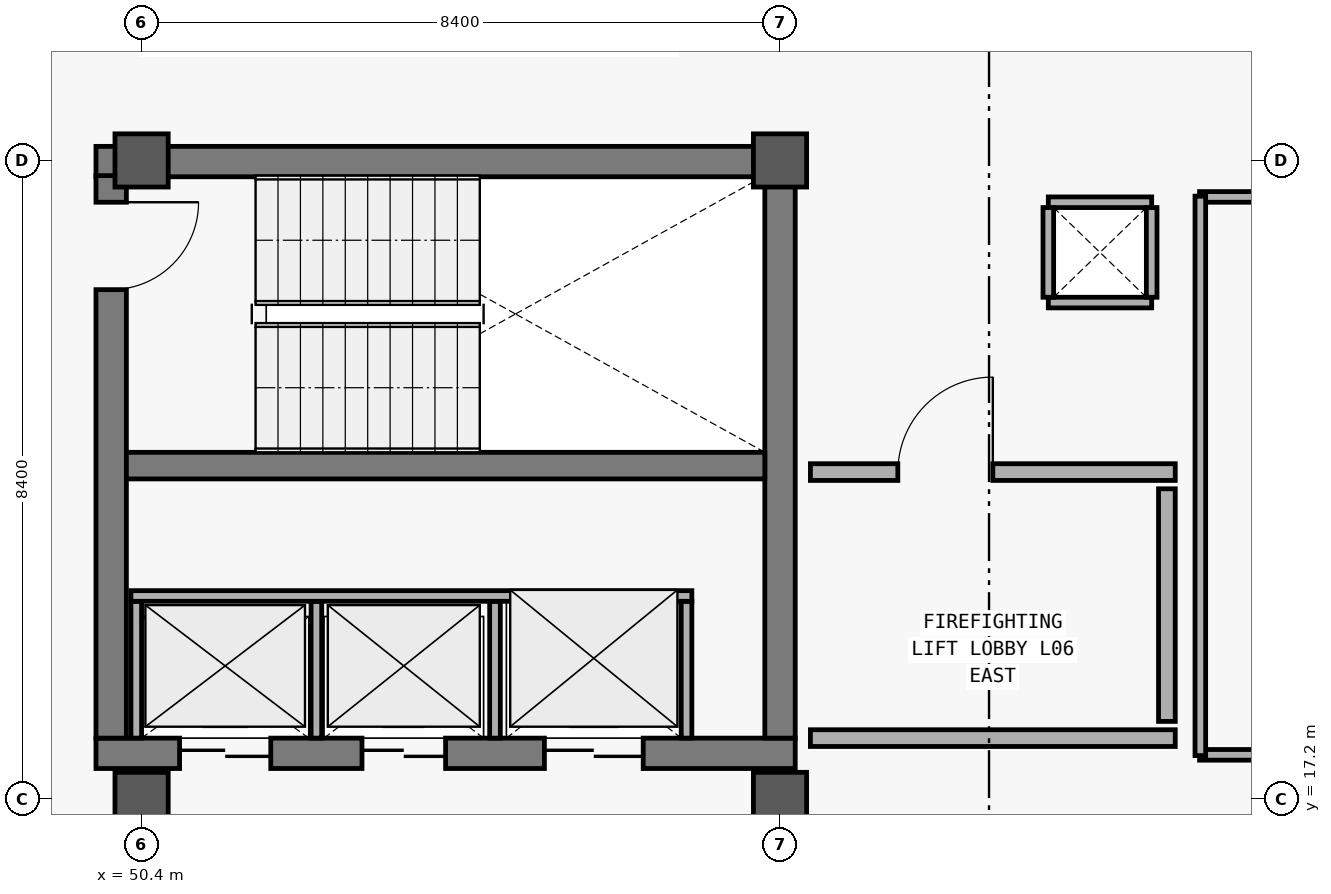
"""IFC4 building model, lengths in metres.
Left out: names, types, materials, properties, quantities, classifications, styles, units other than length and angle.
Written with IfcOpenShell. Run it as: python <this file> out.ifc"""

import sys

from ifc_helpers import new_model, si_unit, direction, frame, frame_2d, origin, origin_2d, place, context, subcontext, project, spatial, rectangle, extrude, element, fill, save


model = new_model("IFC4")
c1 = context("Model", 3, precision=1e-05, world=origin(), true_north=direction((0.0, 1.0)))
c2 = subcontext(c1, "Body", "Model", "MODEL_VIEW")
j1 = project(units=[si_unit("LENGTHUNIT", "METRE"), si_unit("PLANEANGLEUNIT", "RADIAN")], contexts=[c1])
p1 = place(None, origin())
s1 = spatial("IfcSite", under=j1, at=p1, CompositionType="ELEMENT")
p2 = place(p1, origin())
s2 = spatial("IfcBuilding", under=s1, at=p2, CompositionType="ELEMENT")
p3 = place(p2, frame((0.0, 0.0, 26.4)))
s3 = spatial("IfcBuildingStorey", under=s2, at=p3, CompositionType="ELEMENT", Elevation=26.4)
for number, where, z_axis, x_axis in (
    (1, (50.4, 17.2, 0.0), (0.0, 0.0, 1.0), (1.0, 0.0, 0.0)),
    (2, (50.4, 25.6, 0.0), (0.0, 0.0, 1.0), (1.0, 0.0, 0.0)),
    (3, (58.8, 17.2, 0.0), (0.0, 0.0, 1.0), (1.0, 0.0, 0.0)),
    (4, (58.8, 25.6, 0.0), (0.0, 0.0, 1.0), (1.0, 0.0, 0.0)),
):
    element("IfcColumn", number, at=place(p3, frame(where, z_axis=z_axis, x_axis=x_axis)), inside=s3, PredefinedType="COLUMN", context=c2, shape_type="SweptSolid", body=[
        extrude(rectangle(XDim=0.7, YDim=0.7, at=origin_2d()), origin(), (0.0, 0.0, 1.0), 3.6),
    ])
p4 = place(p3, frame((49.8, 17.8, 0.0), z_axis=(0.0, 0.0, 1.0), x_axis=(1.0, 0.0, 0.0)))
e5 = element("IfcWall", 5, at=p4, inside=s3, PredefinedType="SHEAR", context=c2, shape_type="SweptSolid", body=[
    extrude(rectangle(XDim=9.2, YDim=0.4, at=frame_2d((4.6, 0.0))), origin(), (0.0, 0.0, 1.0), 3.32),
])
p5 = place(p4, frame((1.1, 0.0, 0.0)))
e6 = element("IfcOpeningElement", 6, at=p5, cuts=e5, PredefinedType="OPENING", context=c2, shape_type="SweptSolid", body=[
    extrude(rectangle(XDim=1.2, YDim=2.2, at=frame_2d((0.6, 1.1))), frame((0.0, 0.21, 0.0), z_axis=(0.0, -1.0, 0.0), x_axis=(1.0, 0.0, 0.0)), (0.0, 0.0, 1.0), 0.42),
])
p6 = place(p4, frame((3.5, 0.0, 0.0)))
e7 = element("IfcOpeningElement", 7, at=p6, cuts=e5, PredefinedType="OPENING", context=c2, shape_type="SweptSolid", body=[
    extrude(rectangle(XDim=1.1, YDim=2.2, at=frame_2d((0.55, 1.1))), frame((0.0, 0.21, 0.0), z_axis=(0.0, -1.0, 0.0), x_axis=(1.0, 0.0, 0.0)), (0.0, 0.0, 1.0), 0.42),
])
p7 = place(p4, frame((5.9, 0.0, 0.0)))
e8 = element("IfcOpeningElement", 8, at=p7, cuts=e5, PredefinedType="OPENING", context=c2, shape_type="SweptSolid", body=[
    extrude(rectangle(XDim=1.3, YDim=2.3, at=frame_2d((0.65, 1.15))), frame((0.0, 0.21, 0.0), z_axis=(0.0, -1.0, 0.0), x_axis=(1.0, 0.0, 0.0)), (0.0, 0.0, 1.0), 0.42),
])
p8 = place(p3, frame((59.0, 25.585, 0.0), z_axis=(0.0, 0.0, 1.0), x_axis=(-1.0, 0.0, 0.0)))
e9 = element("IfcWall", 9, at=p8, inside=s3, PredefinedType="SHEAR", context=c2, shape_type="SweptSolid", body=[
    extrude(rectangle(XDim=9.2, YDim=0.4, at=frame_2d((4.6, 0.0))), origin(), (0.0, 0.0, 1.0), 3.32),
])
p9 = place(p3, frame((50.0, 25.4, 0.0), z_axis=(0.0, 0.0, 1.0), x_axis=(0.0, -1.0, 0.0)))
e10 = element("IfcWall", 10, at=p9, inside=s3, PredefinedType="SHEAR", context=c2, shape_type="SweptSolid", body=[
    extrude(rectangle(XDim=7.4, YDim=0.4, at=frame_2d((3.7, 0.0))), origin(), (0.0, 0.0, 1.0), 3.32),
])
p10 = place(p9, frame((0.35, 0.0, 0.0)))
e11 = element("IfcOpeningElement", 11, at=p10, cuts=e10, PredefinedType="OPENING", context=c2, shape_type="SweptSolid", body=[
    extrude(rectangle(XDim=1.15, YDim=2.2, at=frame_2d((0.575, 1.1))), frame((0.0, 0.21, 0.0), z_axis=(0.0, -1.0, 0.0), x_axis=(1.0, 0.0, 0.0)), (0.0, 0.0, 1.0), 0.42),
])
p11 = place(p3, frame((58.8, 18.0, 0.0), z_axis=(0.0, 0.0, 1.0), x_axis=(0.0, 1.0, 0.0)))
e12 = element("IfcWall", 12, at=p11, inside=s3, PredefinedType="SHEAR", context=c2, shape_type="SweptSolid", body=[
    extrude(rectangle(XDim=7.4, YDim=0.4, at=frame_2d((3.7, 0.0))), origin(), (0.0, 0.0, 1.0), 3.32),
])
p12 = place(p3, frame((50.2, 21.585, 0.0), z_axis=(0.0, 0.0, 1.0), x_axis=(1.0, 0.0, 0.0)))
e13 = element("IfcWall", 13, at=p12, inside=s3, PredefinedType="SHEAR", context=c2, shape_type="SweptSolid", body=[
    extrude(rectangle(XDim=8.4, YDim=0.35, at=frame_2d((4.2, 0.0))), origin(), (0.0, 0.0, 1.0), 3.32),
])
for number, where, z_axis, x_axis in (
    (14, (50.33, 18.0, 0.0), (0.0, 0.0, 1.0), (0.0, 1.0, 0.0)),
    (15, (52.7, 18.0, 0.0), (0.0, 0.0, 1.0), (0.0, 1.0, 0.0)),
    (16, (55.05, 18.0, 0.0), (0.0, 0.0, 1.0), (0.0, 1.0, 0.0)),
    (17, (57.57, 18.0, 0.0), (0.0, 0.0, 1.0), (0.0, 1.0, 0.0)),
):
    element("IfcWall", number, at=place(p3, frame(where, z_axis=z_axis, x_axis=x_axis)), inside=s3, PredefinedType="PARTITIONING", context=c2, shape_type="SweptSolid", body=[
        extrude(rectangle(XDim=1.8, YDim=0.14, at=frame_2d((0.9, 0.0))), origin(), (0.0, 0.0, 1.0), 2.47),
    ])
p13 = place(p3, frame((50.26, 19.87, 0.0), z_axis=(0.0, 0.0, 1.0), x_axis=(1.0, 0.0, 0.0)))
e18 = element("IfcWall", 18, at=p13, inside=s3, PredefinedType="PARTITIONING", context=c2, shape_type="SweptSolid", body=[
    extrude(rectangle(XDim=7.38, YDim=0.14, at=frame_2d((3.69, 0.0))), origin(), (0.0, 0.0, 1.0), 2.47),
])
p14 = place(p3, frame((59.2, 18.0, 0.0), z_axis=(0.0, 0.0, 1.0), x_axis=(1.0, 0.0, 0.0)))
e19 = element("IfcWall", 19, at=p14, inside=s3, PredefinedType="SOLIDWALL", context=c2, shape_type="SweptSolid", body=[
    extrude(rectangle(XDim=4.8, YDim=0.22, at=frame_2d((2.4, 0.0))), origin(), (0.0, 0.0, 1.0), 2.47),
])
p15 = place(p3, frame((59.2, 21.5, 0.0), z_axis=(0.0, 0.0, 1.0), x_axis=(1.0, 0.0, 0.0)))
e20 = element("IfcWall", 20, at=p15, inside=s3, PredefinedType="SOLIDWALL", context=c2, shape_type="SweptSolid", body=[
    extrude(rectangle(XDim=4.8, YDim=0.22, at=frame_2d((2.4, 0.0))), origin(), (0.0, 0.0, 1.0), 2.47),
])
p16 = place(p15, frame((1.15, 0.0, 0.0)))
e21 = element("IfcOpeningElement", 21, at=p16, cuts=e20, PredefinedType="OPENING", context=c2, shape_type="SweptSolid", body=[
    extrude(rectangle(XDim=1.25, YDim=2.2, at=frame_2d((0.625, 1.1))), frame((0.0, 0.12, 0.0), z_axis=(0.0, -1.0, 0.0), x_axis=(1.0, 0.0, 0.0)), (0.0, 0.0, 1.0), 0.24),
])
p17 = place(p3, frame((63.89, 18.22, 0.0), z_axis=(0.0, 0.0, 1.0), x_axis=(0.0, 1.0, 0.0)))
e22 = element("IfcWall", 22, at=p17, inside=s3, PredefinedType="SOLIDWALL", context=c2, shape_type="SweptSolid", body=[
    extrude(rectangle(XDim=3.06, YDim=0.22, at=frame_2d((1.53, 0.0))), origin(), (0.0, 0.0, 1.0), 2.47),
])
p18 = place(p3, frame((64.32, 17.78, 0.0), z_axis=(0.0, 0.0, 1.0), x_axis=(1.0, 0.0, 0.0)))
e23 = element("IfcWall", 23, at=p18, inside=s3, PredefinedType="PARTITIONING", context=c2, shape_type="SweptSolid", body=[
    extrude(rectangle(XDim=11.0, YDim=0.14, at=frame_2d((5.5, 0.0))), origin(), (0.0, 0.0, 1.0), 2.48),
])
p19 = place(p18, frame((5.958, 0.0, 0.0)))
e24 = element("IfcOpeningElement", 24, at=p19, cuts=e23, PredefinedType="OPENING", context=c2, shape_type="SweptSolid", body=[
    extrude(rectangle(XDim=1.08, YDim=2.25, at=frame_2d((0.54, 1.125))), frame((0.0, 0.08, 0.0), z_axis=(0.0, -1.0, 0.0), x_axis=(1.0, 0.0, 0.0)), (0.0, 0.0, 1.0), 0.16),
])
p20 = place(p3, frame((64.32, 25.12, 0.0), z_axis=(0.0, 0.0, 1.0), x_axis=(1.0, 0.0, 0.0)))
e25 = element("IfcWall", 25, at=p20, inside=s3, PredefinedType="PARTITIONING", context=c2, shape_type="SweptSolid", body=[
    extrude(rectangle(XDim=11.0, YDim=0.14, at=frame_2d((5.5, 0.0))), origin(), (0.0, 0.0, 1.0), 2.48),
])
p21 = place(p3, frame((64.33, 17.77, 0.0), z_axis=(0.0, 0.0, 1.0), x_axis=(0.0, 1.0, 0.0)))
e26 = element("IfcWall", 26, at=p21, inside=s3, PredefinedType="PARTITIONING", context=c2, shape_type="SweptSolid", body=[
    extrude(rectangle(XDim=7.36, YDim=0.14, at=frame_2d((3.68, 0.0))), origin(), (0.0, 0.0, 1.0), 2.48),
])
for number, where, z_axis, x_axis in (
    (27, (62.33, 23.73, 0.0), (0.0, 0.0, 1.0), (1.0, 0.0, 0.0)),
    (28, (63.69, 25.05, 0.0), (0.0, 0.0, 1.0), (-1.0, 0.0, 0.0)),
):
    element("IfcWall", number, at=place(p3, frame(where, z_axis=z_axis, x_axis=x_axis)), inside=s3, PredefinedType="PARTITIONING", context=c2, shape_type="SweptSolid", body=[
        extrude(rectangle(XDim=1.36, YDim=0.14, at=frame_2d((0.68, 0.0))), origin(), (0.0, 0.0, 1.0), 2.44),
    ])
for number, where, z_axis, x_axis in (
    (29, (62.33, 24.98, 0.0), (0.0, 0.0, 1.0), (0.0, -1.0, 0.0)),
    (30, (63.69, 23.8, 0.0), (0.0, 0.0, 1.0), (0.0, 1.0, 0.0)),
):
    element("IfcWall", number, at=place(p3, frame(where, z_axis=z_axis, x_axis=x_axis)), inside=s3, PredefinedType="PARTITIONING", context=c2, shape_type="SweptSolid", body=[
        extrude(rectangle(XDim=1.18, YDim=0.14, at=frame_2d((0.59, 0.0))), origin(), (0.0, 0.0, 1.0), 2.44),
    ])
p22 = place(p10, origin())
e31 = element("IfcDoor", 31, at=p22, inside=s3, OperationType="SINGLE_SWING_LEFT", PredefinedType="DOOR", context=c2, shape_type="SweptSolid", body=[
    extrude(rectangle(XDim=1.15, YDim=2.2, at=frame_2d((0.575, 1.1))), frame((0.0, 0.025, 0.0), z_axis=(0.0, -1.0, 0.0), x_axis=(1.0, 0.0, 0.0)), (0.0, 0.0, 1.0), 0.05),
])
fill(e11, e31)
p23 = place(p5, origin())
e32 = element("IfcDoor", 32, at=p23, inside=s3, OperationType="DOUBLE_DOOR_SLIDING", PredefinedType="DOOR", context=c2, shape_type="SweptSolid", body=[
    extrude(rectangle(XDim=1.2, YDim=2.2, at=frame_2d((0.6, 1.1))), frame((0.0, 0.025, 0.0), z_axis=(0.0, -1.0, 0.0), x_axis=(1.0, 0.0, 0.0)), (0.0, 0.0, 1.0), 0.05),
])
fill(e6, e32)
p24 = place(p6, origin())
e33 = element("IfcDoor", 33, at=p24, inside=s3, OperationType="DOUBLE_DOOR_SLIDING", PredefinedType="DOOR", context=c2, shape_type="SweptSolid", body=[
    extrude(rectangle(XDim=1.1, YDim=2.2, at=frame_2d((0.55, 1.1))), frame((0.0, 0.025, 0.0), z_axis=(0.0, -1.0, 0.0), x_axis=(1.0, 0.0, 0.0)), (0.0, 0.0, 1.0), 0.05),
])
fill(e7, e33)
p25 = place(p7, origin())
e34 = element("IfcDoor", 34, at=p25, inside=s3, OperationType="DOUBLE_DOOR_SLIDING", PredefinedType="DOOR", context=c2, shape_type="SweptSolid", body=[
    extrude(rectangle(XDim=1.3, YDim=2.3, at=frame_2d((0.65, 1.15))), frame((0.0, 0.025, 0.0), z_axis=(0.0, -1.0, 0.0), x_axis=(1.0, 0.0, 0.0)), (0.0, 0.0, 1.0), 0.05),
])
fill(e8, e34)
p26 = place(p16, origin())
e35 = element("IfcDoor", 35, at=p26, inside=s3, OperationType="SINGLE_SWING_RIGHT", PredefinedType="DOOR", context=c2, shape_type="SweptSolid", body=[
    extrude(rectangle(XDim=1.25, YDim=2.2, at=frame_2d((0.625, 1.1))), frame((0.0, 0.025, 0.0), z_axis=(0.0, -1.0, 0.0), x_axis=(1.0, 0.0, 0.0)), (0.0, 0.0, 1.0), 0.05),
])
fill(e21, e35)
save(model, sys.argv[1])
